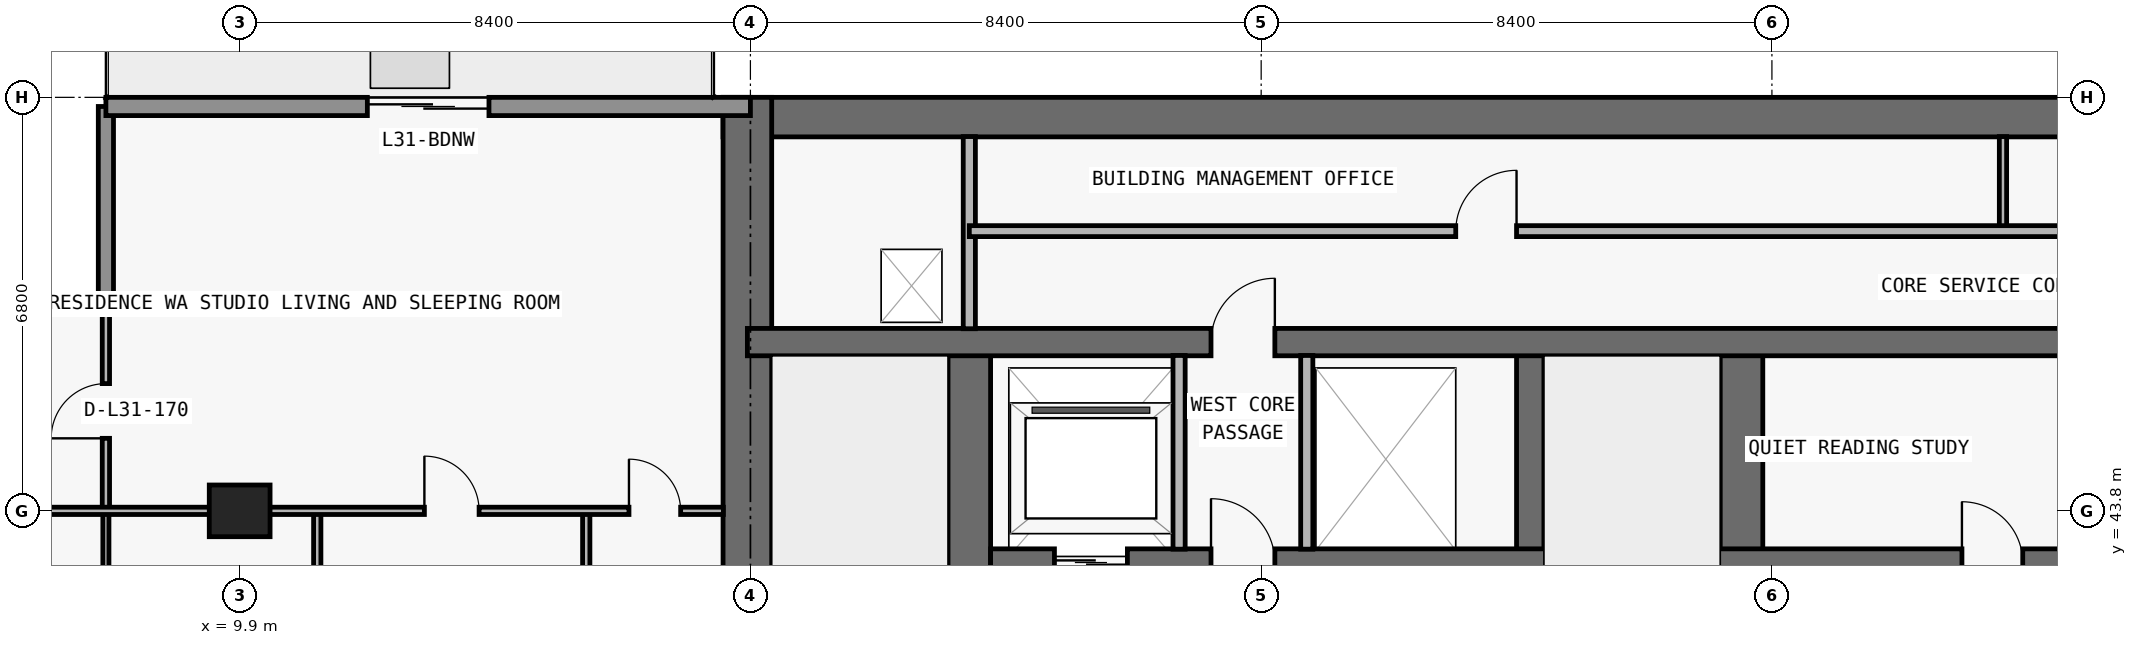
"""IFC4 building model, lengths in metres.
Left out: names, types, materials, properties, quantities, classifications, styles, units other than length and angle.
Written with IfcOpenShell. Run it as: python <this file> out.ifc"""

import sys

from ifc_helpers import new_model, si_unit, direction, frame, frame_2d, origin, origin_2d, place, context, subcontext, project, spatial, rectangle, extrude, element, fill, save


model = new_model("IFC4")
c1 = context("Model", 3, precision=1e-05, world=origin(), true_north=direction((0.0, 1.0)))
c2 = subcontext(c1, "Body", "Model", "MODEL_VIEW")
j1 = project(units=[si_unit("LENGTHUNIT", "METRE"), si_unit("PLANEANGLEUNIT", "RADIAN")], contexts=[c1])
p1 = place(None, origin())
s1 = spatial("IfcSite", under=j1, at=p1, CompositionType="ELEMENT")
p2 = place(p1, origin())
s2 = spatial("IfcBuilding", under=s1, at=p2, CompositionType="ELEMENT")
p3 = place(p2, frame((0.0, 0.0, 115.8)))
s3 = spatial("IfcBuildingStorey", under=s2, at=p3, CompositionType="ELEMENT", Elevation=115.8)
p4 = place(p3, frame((9.9, 43.8, 0.0), z_axis=(0.0, 0.0, 1.0), x_axis=(1.0, 0.0, 0.0)))
e1 = element("IfcColumn", 1, at=p4, inside=s3, PredefinedType="COLUMN", context=c2, shape_type="SweptSolid", body=[
    extrude(rectangle(XDim=1.0, YDim=0.85, at=origin_2d()), origin(), (0.0, 0.0, 1.0), 3.05),
])
p5 = place(p3, frame((17.85, 50.275, 0.0), z_axis=(0.0, 0.0, 1.0), x_axis=(1.0, 0.0, 0.0)))
e2 = element("IfcWall", 2, at=p5, inside=s3, PredefinedType="SHEAR", context=c2, shape_type="SweptSolid", body=[
    extrude(rectangle(XDim=42.1, YDim=0.65, at=frame_2d((21.05, 0.0))), origin(), (0.0, 0.0, 1.0), 3.05),
])
p6 = place(p3, frame((18.25, 36.55, 0.0), z_axis=(0.0, 0.0, 1.0), x_axis=(0.0, 1.0, 0.0)))
e3 = element("IfcWall", 3, at=p6, inside=s3, PredefinedType="SHEAR", context=c2, shape_type="SweptSolid", body=[
    extrude(rectangle(XDim=14.05, YDim=0.8, at=frame_2d((7.025, 0.0))), origin(), (0.0, 0.0, 1.0), 3.05),
])
p7 = place(p3, frame((21.9, 36.95, 0.0), z_axis=(0.0, 0.0, 1.0), x_axis=(0.0, 1.0, 0.0)))
e4 = element("IfcWall", 4, at=p7, inside=s3, PredefinedType="SHEAR", context=c2, shape_type="SweptSolid", body=[
    extrude(rectangle(XDim=9.625, YDim=0.7, at=frame_2d((4.812, 0.0))), origin(), (0.0, 0.0, 1.0), 3.05),
])
p8 = place(p7, frame((0.6, 0.0, 0.0)))
e5 = element("IfcOpeningElement", 5, at=p8, cuts=e4, PredefinedType="OPENING", context=c2, shape_type="SweptSolid", body=[
    extrude(rectangle(XDim=1.1, YDim=2.15, at=frame_2d((0.55, 1.075))), frame((0.0, 0.36, 0.0), z_axis=(0.0, -1.0, 0.0), x_axis=(1.0, 0.0, 0.0)), (0.0, 0.0, 1.0), 0.72),
])
p9 = place(p3, frame((31.125, 36.95, 0.0), z_axis=(0.0, 0.0, 1.0), x_axis=(0.0, 1.0, 0.0)))
e6 = element("IfcWall", 6, at=p9, inside=s3, PredefinedType="SHEAR", context=c2, shape_type="SweptSolid", body=[
    extrude(rectangle(XDim=9.625, YDim=0.45, at=frame_2d((4.812, 0.0))), origin(), (0.0, 0.0, 1.0), 3.05),
])
p10 = place(p3, frame((34.6, 36.95, 0.0), z_axis=(0.0, 0.0, 1.0), x_axis=(0.0, 1.0, 0.0)))
e7 = element("IfcWall", 7, at=p10, inside=s3, PredefinedType="SHEAR", context=c2, shape_type="SweptSolid", body=[
    extrude(rectangle(XDim=9.625, YDim=0.7, at=frame_2d((4.812, 0.0))), origin(), (0.0, 0.0, 1.0), 3.05),
])
p11 = place(p3, frame((22.25, 42.95, 0.0), z_axis=(0.0, 0.0, 1.0), x_axis=(1.0, 0.0, 0.0)))
e8 = element("IfcWall", 8, at=p11, inside=s3, PredefinedType="SHEAR", context=c2, shape_type="SweptSolid", body=[
    extrude(rectangle(XDim=33.3, YDim=0.45, at=frame_2d((16.65, 0.0))), origin(), (0.0, 0.0, 1.0), 3.05),
])
p12 = place(p11, frame((1.05, 0.0, 0.0)))
e9 = element("IfcOpeningElement", 9, at=p12, cuts=e8, PredefinedType="OPENING", context=c2, shape_type="SweptSolid", body=[
    extrude(rectangle(XDim=1.2, YDim=2.2, at=frame_2d((0.6, 1.1))), frame((0.0, 0.235, 0.0), z_axis=(0.0, -1.0, 0.0), x_axis=(1.0, 0.0, 0.0)), (0.0, 0.0, 1.0), 0.47),
])
p13 = place(p11, frame((31.05, 0.0, 0.0)))
e10 = element("IfcOpeningElement", 10, at=p13, cuts=e8, PredefinedType="OPENING", context=c2, shape_type="SweptSolid", body=[
    extrude(rectangle(XDim=1.2, YDim=2.2, at=frame_2d((0.6, 1.1))), frame((0.0, 0.235, 0.0), z_axis=(0.0, -1.0, 0.0), x_axis=(1.0, 0.0, 0.0)), (0.0, 0.0, 1.0), 0.47),
])
p14 = place(p11, frame((21.4, 0.0, 0.0)))
e11 = element("IfcOpeningElement", 11, at=p14, cuts=e8, PredefinedType="OPENING", context=c2, shape_type="SweptSolid", body=[
    extrude(rectangle(XDim=1.1, YDim=2.2, at=frame_2d((0.55, 1.1))), frame((0.0, 0.235, 0.0), z_axis=(0.0, -1.0, 0.0), x_axis=(1.0, 0.0, 0.0)), (0.0, 0.0, 1.0), 0.47),
])
p15 = place(p11, frame((24.0, 0.0, 0.0)))
e12 = element("IfcOpeningElement", 12, at=p15, cuts=e8, PredefinedType="OPENING", context=c2, shape_type="SweptSolid", body=[
    extrude(rectangle(XDim=1.1, YDim=2.2, at=frame_2d((0.55, 1.1))), frame((0.0, 0.235, 0.0), z_axis=(0.0, -1.0, 0.0), x_axis=(1.0, 0.0, 0.0)), (0.0, 0.0, 1.0), 0.47),
])
p16 = place(p11, frame((3.625, 0.0, 0.0)))
e13 = element("IfcOpeningElement", 13, at=p16, cuts=e8, PredefinedType="OPENING", context=c2, shape_type="SweptSolid", body=[
    extrude(rectangle(XDim=1.05, YDim=2.15, at=frame_2d((0.525, 1.075))), frame((0.0, 0.235, 0.0), z_axis=(0.0, -1.0, 0.0), x_axis=(1.0, 0.0, 0.0)), (0.0, 0.0, 1.0), 0.47),
])
p17 = place(p11, frame((28.675, 0.0, 0.0)))
e14 = element("IfcOpeningElement", 14, at=p17, cuts=e8, PredefinedType="OPENING", context=c2, shape_type="SweptSolid", body=[
    extrude(rectangle(XDim=1.05, YDim=2.15, at=frame_2d((0.525, 1.075))), frame((0.0, 0.235, 0.0), z_axis=(0.0, -1.0, 0.0), x_axis=(1.0, 0.0, 0.0)), (0.0, 0.0, 1.0), 0.47),
])
p18 = place(p11, frame((15.975, 0.0, 0.0)))
e15 = element("IfcOpeningElement", 15, at=p18, cuts=e8, PredefinedType="OPENING", context=c2, shape_type="SweptSolid", body=[
    extrude(rectangle(XDim=1.0, YDim=2.2, at=frame_2d((0.5, 1.1))), frame((0.0, 0.235, 0.0), z_axis=(0.0, -1.0, 0.0), x_axis=(1.0, 0.0, 0.0)), (0.0, 0.0, 1.0), 0.47),
])
p19 = place(p3, frame((18.25, 46.575, 0.0), z_axis=(0.0, 0.0, 1.0), x_axis=(1.0, 0.0, 0.0)))
e16 = element("IfcWall", 16, at=p19, inside=s3, PredefinedType="SHEAR", context=c2, shape_type="SweptSolid", body=[
    extrude(rectangle(XDim=41.3, YDim=0.45, at=frame_2d((20.65, 0.0))), origin(), (0.0, 0.0, 1.0), 3.05),
])
p20 = place(p19, frame((7.625, 0.0, 0.0)))
e17 = element("IfcOpeningElement", 17, at=p20, cuts=e16, PredefinedType="OPENING", context=c2, shape_type="SweptSolid", body=[
    extrude(rectangle(XDim=1.05, YDim=2.15, at=frame_2d((0.525, 1.075))), frame((0.0, 0.235, 0.0), z_axis=(0.0, -1.0, 0.0), x_axis=(1.0, 0.0, 0.0)), (0.0, 0.0, 1.0), 0.47),
])
p21 = place(p19, frame((32.675, 0.0, 0.0)))
e18 = element("IfcOpeningElement", 18, at=p21, cuts=e16, PredefinedType="OPENING", context=c2, shape_type="SweptSolid", body=[
    extrude(rectangle(XDim=1.05, YDim=2.15, at=frame_2d((0.525, 1.075))), frame((0.0, 0.235, 0.0), z_axis=(0.0, -1.0, 0.0), x_axis=(1.0, 0.0, 0.0)), (0.0, 0.0, 1.0), 0.47),
])
p22 = place(p3, frame((4.05, 47.2, 0.0), z_axis=(0.0, 0.0, 1.0), x_axis=(1.0, 0.0, 0.0)))
e19 = element("IfcWall", 19, at=p22, inside=s3, PredefinedType="ELEMENTEDWALL", context=c2, shape_type="SweptSolid", body=[
    extrude(rectangle(XDim=3.65, YDim=0.25, at=frame_2d((1.825, 0.0))), origin(), (0.0, 0.0, 1.0), 3.05),
])
p23 = place(p3, frame((7.7, 47.2, 0.0), z_axis=(0.0, 0.0, 1.0), x_axis=(0.0, 1.0, 0.0)))
e20 = element("IfcWall", 20, at=p23, inside=s3, PredefinedType="ELEMENTEDWALL", context=c2, shape_type="SweptSolid", body=[
    extrude(rectangle(XDim=3.25, YDim=0.25, at=frame_2d((1.625, 0.0))), origin(), (0.0, 0.0, 1.0), 3.05),
])
p24 = place(p3, frame((7.7, 50.45, 0.0), z_axis=(0.0, 0.0, 1.0), x_axis=(1.0, 0.0, 0.0)))
e21 = element("IfcWall", 21, at=p24, inside=s3, PredefinedType="STANDARD", context=c2, shape_type="SweptSolid", body=[
    extrude(rectangle(XDim=10.6, YDim=0.3, at=frame_2d((5.3, 0.0))), origin(), (0.0, 0.0, 1.0), 3.05),
])
p25 = place(p24, frame((4.3, 0.0, 0.0)))
e22 = element("IfcOpeningElement", 22, at=p25, cuts=e21, PredefinedType="OPENING", context=c2, shape_type="SweptSolid", body=[
    extrude(rectangle(XDim=2.0, YDim=2.3, at=frame_2d((1.0, 1.15))), frame((0.0, 0.16, 0.0), z_axis=(0.0, -1.0, 0.0), x_axis=(1.0, 0.0, 0.0)), (0.0, 0.0, 1.0), 0.32),
])
p26 = place(p3, frame((7.7, 36.955, 0.0), z_axis=(0.0, 0.0, 1.0), x_axis=(0.0, 1.0, 0.0)))
e23 = element("IfcWall", 23, at=p26, inside=s3, PredefinedType="MOVABLE", context=c2, shape_type="SweptSolid", body=[
    extrude(rectangle(XDim=6.845, YDim=0.1, at=frame_2d((3.422, 0.0))), origin(), (0.0, 0.0, 1.0), 3.05),
])
p27 = place(p26, frame((2.972, 0.0, 0.0)))
e24 = element("IfcOpeningElement", 24, at=p27, cuts=e23, PredefinedType="OPENING", context=c2, shape_type="SweptSolid", body=[
    extrude(rectangle(XDim=0.9, YDim=2.15, at=frame_2d((0.45, 1.075))), frame((0.0, 0.06, 0.0), z_axis=(0.0, -1.0, 0.0), x_axis=(1.0, 0.0, 0.0)), (0.0, 0.0, 1.0), 0.12),
])
p28 = place(p3, frame((7.7, 43.805, 0.0), z_axis=(0.0, 0.0, 1.0), x_axis=(0.0, 1.0, 0.0)))
e25 = element("IfcWall", 25, at=p28, inside=s3, PredefinedType="PARTITIONING", context=c2, shape_type="SweptSolid", body=[
    extrude(rectangle(XDim=3.275, YDim=0.12, at=frame_2d((1.638, 0.0))), origin(), (0.0, 0.0, 1.0), 3.05),
])
p29 = place(p28, frame((1.188, 0.0, 0.0)))
e26 = element("IfcOpeningElement", 26, at=p29, cuts=e25, PredefinedType="OPENING", context=c2, shape_type="SweptSolid", body=[
    extrude(rectangle(XDim=0.9, YDim=2.15, at=frame_2d((0.45, 1.075))), frame((0.0, 0.07, 0.0), z_axis=(0.0, -1.0, 0.0), x_axis=(1.0, 0.0, 0.0)), (0.0, 0.0, 1.0), 0.14),
])
p30 = place(p3, frame((11.176, 36.95, 0.0), z_axis=(0.0, 0.0, 1.0), x_axis=(0.0, 1.0, 0.0)))
e27 = element("IfcWall", 27, at=p30, inside=s3, PredefinedType="PARTITIONING", context=c2, shape_type="SweptSolid", body=[
    extrude(rectangle(XDim=6.85, YDim=0.12, at=frame_2d((3.425, 0.0))), origin(), (0.0, 0.0, 1.0), 3.05),
])
p31 = place(p30, frame((2.975, 0.0, 0.0)))
e28 = element("IfcOpeningElement", 28, at=p31, cuts=e27, PredefinedType="OPENING", context=c2, shape_type="SweptSolid", body=[
    extrude(rectangle(XDim=0.9, YDim=2.15, at=frame_2d((0.45, 1.075))), frame((0.0, 0.07, 0.0), z_axis=(0.0, -1.0, 0.0), x_axis=(1.0, 0.0, 0.0)), (0.0, 0.0, 1.0), 0.14),
])
p32 = place(p3, frame((15.6, 36.95, 0.0), z_axis=(0.0, 0.0, 1.0), x_axis=(0.0, 1.0, 0.0)))
e29 = element("IfcWall", 29, at=p32, inside=s3, PredefinedType="PARTITIONING", context=c2, shape_type="SweptSolid", body=[
    extrude(rectangle(XDim=6.85, YDim=0.12, at=frame_2d((3.425, 0.0))), origin(), (0.0, 0.0, 1.0), 3.05),
])
p33 = place(p32, frame((1.219, 0.0, 0.0)))
e30 = element("IfcOpeningElement", 30, at=p33, cuts=e29, PredefinedType="OPENING", context=c2, shape_type="SweptSolid", body=[
    extrude(rectangle(XDim=0.85, YDim=2.1, at=frame_2d((0.425, 1.05))), frame((0.0, 0.07, 0.0), z_axis=(0.0, -1.0, 0.0), x_axis=(1.0, 0.0, 0.0)), (0.0, 0.0, 1.0), 0.14),
])
p34 = place(p3, frame((21.9, 46.795, 0.0), z_axis=(0.0, 0.0, 1.0), x_axis=(0.0, 1.0, 0.0)))
e31 = element("IfcWall", 31, at=p34, inside=s3, PredefinedType="PARTITIONING", context=c2, shape_type="SweptSolid", body=[
    extrude(rectangle(XDim=3.16, YDim=0.2, at=frame_2d((1.58, 0.0))), origin(), (0.0, 0.0, 1.0), 3.05),
])
for number, where, z_axis, x_axis in (
    (32, (25.35, 43.17, 0.0), (0.0, 0.0, 1.0), (0.0, 1.0, 0.0)),
    (33, (27.45, 43.17, 0.0), (0.0, 0.0, 1.0), (0.0, 1.0, 0.0)),
):
    element("IfcWall", number, at=place(p3, frame(where, z_axis=z_axis, x_axis=x_axis)), inside=s3, PredefinedType="PARTITIONING", context=c2, shape_type="SweptSolid", body=[
        extrude(rectangle(XDim=3.185, YDim=0.2, at=frame_2d((1.593, 0.0))), origin(), (0.0, 0.0, 1.0), 3.05),
    ])
p35 = place(p3, frame((38.9, 48.4, 0.0), z_axis=(0.0, 0.0, 1.0), x_axis=(0.0, 1.0, 0.0)))
e34 = element("IfcWall", 34, at=p35, inside=s3, PredefinedType="PARTITIONING", context=c2, shape_type="SweptSolid", body=[
    extrude(rectangle(XDim=1.555, YDim=0.12, at=frame_2d((0.778, 0.0))), origin(), (0.0, 0.0, 1.0), 3.05),
])
p36 = place(p3, frame((4.195, 43.8, 0.0), z_axis=(0.0, 0.0, 1.0), x_axis=(1.0, 0.0, 0.0)))
e35 = element("IfcWall", 35, at=p36, inside=s3, PredefinedType="PARTITIONING", context=c2, shape_type="SweptSolid", body=[
    extrude(rectangle(XDim=13.66, YDim=0.12, at=frame_2d((6.83, 0.0))), origin(), (0.0, 0.0, 1.0), 2.339),
])
p37 = place(p36, frame((8.743, 0.0, 0.0)))
e36 = element("IfcOpeningElement", 36, at=p37, cuts=e35, PredefinedType="OPENING", context=c2, shape_type="SweptSolid", body=[
    extrude(rectangle(XDim=0.9, YDim=2.15, at=frame_2d((0.45, 1.075))), frame((0.0, 0.07, 0.0), z_axis=(0.0, -1.0, 0.0), x_axis=(1.0, 0.0, 0.0)), (0.0, 0.0, 1.0), 0.14),
])
p38 = place(p36, frame((12.107, 0.0, 0.0)))
e37 = element("IfcOpeningElement", 37, at=p38, cuts=e35, PredefinedType="OPENING", context=c2, shape_type="SweptSolid", body=[
    extrude(rectangle(XDim=0.85, YDim=2.1, at=frame_2d((0.425, 1.05))), frame((0.0, 0.07, 0.0), z_axis=(0.0, -1.0, 0.0), x_axis=(1.0, 0.0, 0.0)), (0.0, 0.0, 1.0), 0.14),
])
p39 = place(p3, frame((21.9, 48.4, 0.0), z_axis=(0.0, 0.0, 1.0), x_axis=(1.0, 0.0, 0.0)))
e38 = element("IfcWall", 38, at=p39, inside=s3, PredefinedType="PARTITIONING", context=c2, shape_type="SweptSolid", body=[
    extrude(rectangle(XDim=34.0, YDim=0.18, at=frame_2d((17.0, 0.0))), origin(), (0.0, 0.0, 1.0), 3.05),
])
p40 = place(p39, frame((8.0, 0.0, 0.0)))
e39 = element("IfcOpeningElement", 39, at=p40, cuts=e38, PredefinedType="OPENING", context=c2, shape_type="SweptSolid", body=[
    extrude(rectangle(XDim=1.0, YDim=2.2, at=frame_2d((0.5, 1.1))), frame((0.0, 0.1, 0.0), z_axis=(0.0, -1.0, 0.0), x_axis=(1.0, 0.0, 0.0)), (0.0, 0.0, 1.0), 0.2),
])
p41 = place(p39, frame((25.0, 0.0, 0.0)))
e40 = element("IfcOpeningElement", 40, at=p41, cuts=e38, PredefinedType="OPENING", context=c2, shape_type="SweptSolid", body=[
    extrude(rectangle(XDim=1.0, YDim=2.2, at=frame_2d((0.5, 1.1))), frame((0.0, 0.1, 0.0), z_axis=(0.0, -1.0, 0.0), x_axis=(1.0, 0.0, 0.0)), (0.0, 0.0, 1.0), 0.2),
])
p42 = place(p25, origin())
e41 = element("IfcDoor", 41, at=p42, inside=s3, OperationType="DOUBLE_DOOR_SLIDING", PredefinedType="DOOR", context=c2, shape_type="SweptSolid", body=[
    extrude(rectangle(XDim=2.0, YDim=2.3, at=frame_2d((1.0, 1.15))), frame((0.0, 0.025, 0.0), z_axis=(0.0, -1.0, 0.0), x_axis=(1.0, 0.0, 0.0)), (0.0, 0.0, 1.0), 0.05),
])
fill(e22, e41)
p43 = place(p12, origin())
e42 = element("IfcDoor", 42, at=p43, inside=s3, OperationType="DOUBLE_DOOR_SLIDING", PredefinedType="DOOR", context=c2, shape_type="SweptSolid", body=[
    extrude(rectangle(XDim=1.2, YDim=2.2, at=frame_2d((0.6, 1.1))), frame((0.0, 0.025, 0.0), z_axis=(0.0, -1.0, 0.0), x_axis=(1.0, 0.0, 0.0)), (0.0, 0.0, 1.0), 0.05),
])
fill(e9, e42)
p44 = place(p16, origin())
e43 = element("IfcDoor", 43, at=p44, inside=s3, OperationType="SINGLE_SWING_LEFT", PredefinedType="DOOR", context=c2, shape_type="SweptSolid", body=[
    extrude(rectangle(XDim=1.05, YDim=2.15, at=frame_2d((0.525, 1.075))), frame((0.0, 0.025, 0.0), z_axis=(0.0, -1.0, 0.0), x_axis=(1.0, 0.0, 0.0)), (0.0, 0.0, 1.0), 0.05),
])
fill(e13, e43)
p45 = place(p18, origin())
e44 = element("IfcDoor", 44, at=p45, inside=s3, OperationType="SINGLE_SWING_LEFT", PredefinedType="DOOR", context=c2, shape_type="SweptSolid", body=[
    extrude(rectangle(XDim=1.0, YDim=2.2, at=frame_2d((0.5, 1.1))), frame((0.0, 0.025, 0.0), z_axis=(0.0, -1.0, 0.0), x_axis=(1.0, 0.0, 0.0)), (0.0, 0.0, 1.0), 0.05),
])
fill(e15, e44)
p46 = place(p20, origin())
e45 = element("IfcDoor", 45, at=p46, inside=s3, OperationType="SINGLE_SWING_RIGHT", PredefinedType="DOOR", context=c2, shape_type="SweptSolid", body=[
    extrude(rectangle(XDim=1.05, YDim=2.15, at=frame_2d((0.525, 1.075))), frame((0.0, 0.025, 0.0), z_axis=(0.0, -1.0, 0.0), x_axis=(1.0, 0.0, 0.0)), (0.0, 0.0, 1.0), 0.05),
])
fill(e17, e45)
p47 = place(p40, origin())
e46 = element("IfcDoor", 46, at=p47, inside=s3, OperationType="SINGLE_SWING_RIGHT", PredefinedType="DOOR", context=c2, shape_type="SweptSolid", body=[
    extrude(rectangle(XDim=1.0, YDim=2.2, at=frame_2d((0.5, 1.1))), frame((0.0, 0.025, 0.0), z_axis=(0.0, -1.0, 0.0), x_axis=(1.0, 0.0, 0.0)), (0.0, 0.0, 1.0), 0.05),
])
fill(e39, e46)
p48 = place(p37, origin())
e47 = element("IfcDoor", 47, at=p48, inside=s3, OperationType="SINGLE_SWING_LEFT", PredefinedType="DOOR", context=c2, shape_type="SweptSolid", body=[
    extrude(rectangle(XDim=0.9, YDim=2.15, at=frame_2d((0.45, 1.075))), frame((0.0, 0.025, 0.0), z_axis=(0.0, -1.0, 0.0), x_axis=(1.0, 0.0, 0.0)), (0.0, 0.0, 1.0), 0.05),
])
fill(e36, e47)
p49 = place(p38, origin())
e48 = element("IfcDoor", 48, at=p49, inside=s3, OperationType="SINGLE_SWING_LEFT", PredefinedType="DOOR", context=c2, shape_type="SweptSolid", body=[
    extrude(rectangle(XDim=0.85, YDim=2.1, at=frame_2d((0.425, 1.05))), frame((0.0, 0.025, 0.0), z_axis=(0.0, -1.0, 0.0), x_axis=(1.0, 0.0, 0.0)), (0.0, 0.0, 1.0), 0.05),
])
fill(e37, e48)
p50 = place(p29, origin())
e49 = element("IfcDoor", 49, at=p50, inside=s3, OperationType="SINGLE_SWING_LEFT", PredefinedType="DOOR", context=c2, shape_type="SweptSolid", body=[
    extrude(rectangle(XDim=0.9, YDim=2.15, at=frame_2d((0.45, 1.075))), frame((0.0, 0.025, 0.0), z_axis=(0.0, -1.0, 0.0), x_axis=(1.0, 0.0, 0.0)), (0.0, 0.0, 1.0), 0.05),
])
fill(e26, e49)
save(model, sys.argv[1])
